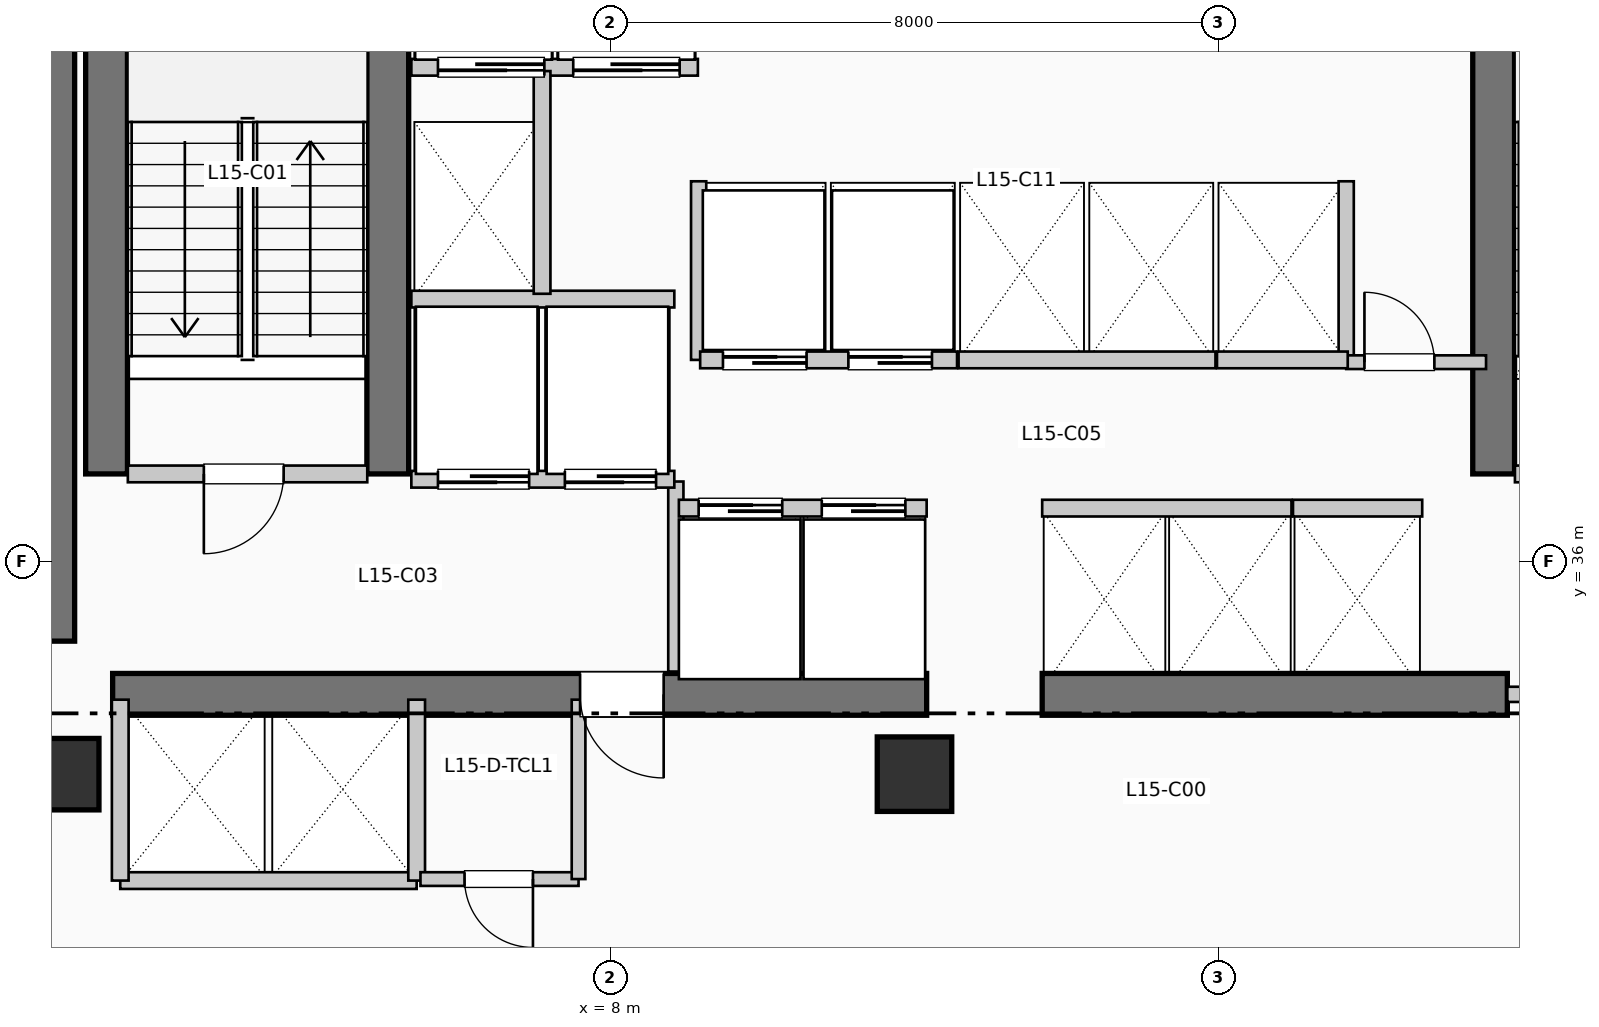
"""IFC4 building model, lengths in metres.
Left out: names, types, materials, properties, quantities, classifications, styles, units other than length and angle.
Written with IfcOpenShell. Run it as: python <this file> out.ifc"""

import sys

from ifc_helpers import new_model, si_unit, direction, frame, frame_2d, origin, origin_2d, place, context, subcontext, project, spatial, rectangle, extrude, element, fill, save


model = new_model("IFC4")
c1 = context("Model", 3, precision=1e-05, world=origin(), true_north=direction((0.0, 1.0)))
c2 = subcontext(c1, "Body", "Model", "MODEL_VIEW")
j1 = project(units=[si_unit("LENGTHUNIT", "METRE"), si_unit("PLANEANGLEUNIT", "RADIAN")], contexts=[c1])
p1 = place(None, origin())
s1 = spatial("IfcSite", under=j1, at=p1, CompositionType="ELEMENT")
p2 = place(p1, origin())
s2 = spatial("IfcBuilding", under=s1, at=p2, CompositionType="ELEMENT")
p3 = place(p2, frame((0.0, 0.0, 66.0)))
s3 = spatial("IfcBuildingStorey", under=s2, at=p3, CompositionType="ELEMENT", Elevation=66.0)
p4 = place(p3, frame((0.5, 34.95, 0.0), z_axis=(0.0, 0.0, 1.0), x_axis=(0.0, 1.0, 0.0)))
e1 = element("IfcWall", 1, at=p4, inside=s3, PredefinedType="SHEAR", context=c2, shape_type="SweptSolid", body=[
    extrude(rectangle(XDim=7.9, YDim=0.9, at=frame_2d((3.95, 0.0))), origin(), (0.0, 0.0, 1.0), 3.96),
])
p5 = place(p3, frame((1.45, 34.25, 0.0), z_axis=(0.0, 0.0, 1.0), x_axis=(1.0, 0.0, 0.0)))
e2 = element("IfcWall", 2, at=p5, inside=s3, PredefinedType="SHEAR", context=c2, shape_type="SweptSolid", body=[
    extrude(rectangle(XDim=10.71, YDim=0.55, at=frame_2d((5.355, 0.0))), origin(), (0.0, 0.0, 1.0), 3.96),
])
p6 = place(p5, frame((7.25, 0.0, 0.0), z_axis=(0.0, 0.0, 1.0), x_axis=(-1.0, 0.0, 0.0)))
e3 = element("IfcOpeningElement", 3, at=p6, cuts=e2, PredefinedType="OPENING", context=c2, shape_type="SweptSolid", body=[
    extrude(rectangle(XDim=1.1, YDim=2.15, at=frame_2d((0.55, 1.075))), frame((0.0, 0.285, 0.0), z_axis=(0.0, -1.0, 0.0), x_axis=(1.0, 0.0, 0.0)), (0.0, 0.0, 1.0), 0.57),
])
p7 = place(p3, frame((13.68, 34.25, 0.0), z_axis=(0.0, 0.0, 1.0), x_axis=(1.0, 0.0, 0.0)))
e4 = element("IfcWall", 4, at=p7, inside=s3, PredefinedType="SHEAR", context=c2, shape_type="SweptSolid", body=[
    extrude(rectangle(XDim=6.12, YDim=0.55, at=frame_2d((3.06, 0.0))), origin(), (0.0, 0.0, 1.0), 3.96),
])
for number, where, z_axis, x_axis in (
    (5, (1.37, 37.15, 0.0), (0.0, 0.0, 1.0), (0.0, 1.0, 0.0)),
    (6, (5.07, 37.15, 0.0), (0.0, 0.0, 1.0), (0.0, 1.0, 0.0)),
    (7, (19.62, 37.15, 0.0), (0.0, 0.0, 1.0), (0.0, 1.0, 0.0)),
):
    element("IfcWall", number, at=place(p3, frame(where, z_axis=z_axis, x_axis=x_axis)), inside=s3, PredefinedType="SHEAR", context=c2, shape_type="SweptSolid", body=[
        extrude(rectangle(XDim=7.89, YDim=0.55, at=frame_2d((3.945, 0.0))), origin(), (0.0, 0.0, 1.0), 3.96),
    ])
p8 = place(p3, frame((0.8, 33.2, 0.0), z_axis=(0.0, 0.0, 1.0), x_axis=(1.0, 0.0, 0.0)))
e8 = element("IfcColumn", 8, at=p8, inside=s3, PredefinedType="COLUMN", context=c2, shape_type="SweptSolid", body=[
    extrude(rectangle(XDim=0.94, YDim=0.94, at=origin_2d()), origin(), (0.0, 0.0, 1.0), 3.96),
])
p9 = place(p3, frame((12.0, 33.2, 0.0), z_axis=(0.0, 0.0, 1.0), x_axis=(1.0, 0.0, 0.0)))
e9 = element("IfcColumn", 9, at=p9, inside=s3, PredefinedType="COLUMN", context=c2, shape_type="SweptSolid", body=[
    extrude(rectangle(XDim=0.98, YDim=0.98, at=origin_2d()), origin(), (0.0, 0.0, 1.0), 3.96),
])
p10 = place(p3, frame((1.65, 37.15, 0.0), z_axis=(0.0, 0.0, 1.0), x_axis=(1.0, 0.0, 0.0)))
e10 = element("IfcWall", 10, at=p10, inside=s3, PredefinedType="PARTITIONING", context=c2, shape_type="SweptSolid", body=[
    extrude(rectangle(XDim=3.15, YDim=0.22, at=frame_2d((1.575, 0.0))), origin(), (0.0, 0.0, 1.0), 3.71),
])
p11 = place(p10, frame((2.05, 0.0, 0.0), z_axis=(0.0, 0.0, 1.0), x_axis=(-1.0, 0.0, 0.0)))
e11 = element("IfcOpeningElement", 11, at=p11, cuts=e10, PredefinedType="OPENING", context=c2, shape_type="SweptSolid", body=[
    extrude(rectangle(XDim=1.05, YDim=2.15, at=frame_2d((0.525, 1.075))), frame((0.0, 0.12, 0.0), z_axis=(0.0, -1.0, 0.0), x_axis=(1.0, 0.0, 0.0)), (0.0, 0.0, 1.0), 0.24),
])
p12 = place(p3, frame((8.86, 34.55, 0.0), z_axis=(0.0, 0.0, 1.0), x_axis=(0.0, 1.0, 0.0)))
e12 = element("IfcWall", 12, at=p12, inside=s3, PredefinedType="PARTITIONING", context=c2, shape_type="SweptSolid", body=[
    extrude(rectangle(XDim=2.5, YDim=0.2, at=frame_2d((1.25, 0.0))), origin(), (0.0, 0.0, 1.0), 3.71),
])
p13 = place(p3, frame((19.9, 37.15, 0.0), z_axis=(0.0, 0.0, 1.0), x_axis=(1.0, 0.0, 0.0)))
e13 = element("IfcWall", 13, at=p13, inside=s3, PredefinedType="PARTITIONING", context=c2, shape_type="SweptSolid", body=[
    extrude(rectangle(XDim=3.15, YDim=0.22, at=frame_2d((1.575, 0.0))), origin(), (0.0, 0.0, 1.0), 3.71),
])
p14 = place(p13, frame((2.05, 0.0, 0.0), z_axis=(0.0, 0.0, 1.0), x_axis=(-1.0, 0.0, 0.0)))
e14 = element("IfcOpeningElement", 14, at=p14, cuts=e13, PredefinedType="OPENING", context=c2, shape_type="SweptSolid", body=[
    extrude(rectangle(XDim=1.05, YDim=2.15, at=frame_2d((0.525, 1.075))), frame((0.0, 0.12, 0.0), z_axis=(0.0, -1.0, 0.0), x_axis=(1.0, 0.0, 0.0)), (0.0, 0.0, 1.0), 0.24),
])
p15 = place(p3, frame((19.8, 34.25, 0.0), z_axis=(0.0, 0.0, 1.0), x_axis=(1.0, 0.0, 0.0)))
e15 = element("IfcWall", 15, at=p15, inside=s3, PredefinedType="PARTITIONING", context=c2, shape_type="SweptSolid", body=[
    extrude(rectangle(XDim=3.25, YDim=0.2, at=frame_2d((1.625, 0.0))), origin(), (0.0, 0.0, 1.0), 3.71),
])
p16 = place(p15, frame((2.15, 0.0, 0.0), z_axis=(0.0, 0.0, 1.0), x_axis=(-1.0, 0.0, 0.0)))
e16 = element("IfcOpeningElement", 16, at=p16, cuts=e15, PredefinedType="OPENING", context=c2, shape_type="SweptSolid", body=[
    extrude(rectangle(XDim=1.1, YDim=2.15, at=frame_2d((0.55, 1.075))), frame((0.0, 0.11, 0.0), z_axis=(0.0, -1.0, 0.0), x_axis=(1.0, 0.0, 0.0)), (0.0, 0.0, 1.0), 0.22),
])
p17 = place(p3, frame((5.38, 37.08, 0.0), z_axis=(0.0, 0.0, 1.0), x_axis=(1.0, 0.0, 0.0)))
e17 = element("IfcWall", 17, at=p17, inside=s3, PredefinedType="PARTITIONING", context=c2, shape_type="SweptSolid", body=[
    extrude(rectangle(XDim=3.46, YDim=0.22, at=frame_2d((1.73, 0.0))), origin(), (0.0, 0.0, 1.0), 3.71),
])
p18 = place(p17, frame((1.55, 0.0, 0.0), z_axis=(0.0, 0.0, 1.0), x_axis=(-1.0, 0.0, 0.0)))
e18 = element("IfcOpeningElement", 18, at=p18, cuts=e17, PredefinedType="OPENING", context=c2, shape_type="SweptSolid", body=[
    extrude(rectangle(XDim=1.2, YDim=2.2, at=frame_2d((0.6, 1.1))), frame((0.0, 0.12, 0.0), z_axis=(0.0, -1.0, 0.0), x_axis=(1.0, 0.0, 0.0)), (0.0, 0.0, 1.0), 0.24),
])
p19 = place(p17, frame((3.22, 0.0, 0.0), z_axis=(0.0, 0.0, 1.0), x_axis=(-1.0, 0.0, 0.0)))
e19 = element("IfcOpeningElement", 19, at=p19, cuts=e17, PredefinedType="OPENING", context=c2, shape_type="SweptSolid", body=[
    extrude(rectangle(XDim=1.2, YDim=2.2, at=frame_2d((0.6, 1.1))), frame((0.0, 0.12, 0.0), z_axis=(0.0, -1.0, 0.0), x_axis=(1.0, 0.0, 0.0)), (0.0, 0.0, 1.0), 0.24),
])
p20 = place(p3, frame((5.38, 39.45, 0.0), z_axis=(0.0, 0.0, 1.0), x_axis=(1.0, 0.0, 0.0)))
e20 = element("IfcWall", 20, at=p20, inside=s3, PredefinedType="PARTITIONING", context=c2, shape_type="SweptSolid", body=[
    extrude(rectangle(XDim=3.46, YDim=0.22, at=frame_2d((1.73, 0.0))), origin(), (0.0, 0.0, 1.0), 3.71),
])
p21 = place(p3, frame((5.38, 42.5, 0.0), z_axis=(0.0, 0.0, 1.0), x_axis=(1.0, 0.0, 0.0)))
e21 = element("IfcWall", 21, at=p21, inside=s3, PredefinedType="PARTITIONING", context=c2, shape_type="SweptSolid", body=[
    extrude(rectangle(XDim=3.77, YDim=0.22, at=frame_2d((1.885, 0.0))), origin(), (0.0, 0.0, 1.0), 3.71),
])
p22 = place(p21, frame((1.75, 0.0, 0.0), z_axis=(0.0, 0.0, 1.0), x_axis=(-1.0, 0.0, 0.0)))
e22 = element("IfcOpeningElement", 22, at=p22, cuts=e21, PredefinedType="OPENING", context=c2, shape_type="SweptSolid", body=[
    extrude(rectangle(XDim=1.4, YDim=2.2, at=frame_2d((0.7, 1.1))), frame((0.0, 0.12, 0.0), z_axis=(0.0, -1.0, 0.0), x_axis=(1.0, 0.0, 0.0)), (0.0, 0.0, 1.0), 0.24),
])
p23 = place(p21, frame((3.53, 0.0, 0.0), z_axis=(0.0, 0.0, 1.0), x_axis=(-1.0, 0.0, 0.0)))
e23 = element("IfcOpeningElement", 23, at=p23, cuts=e21, PredefinedType="OPENING", context=c2, shape_type="SweptSolid", body=[
    extrude(rectangle(XDim=1.4, YDim=2.2, at=frame_2d((0.7, 1.1))), frame((0.0, 0.12, 0.0), z_axis=(0.0, -1.0, 0.0), x_axis=(1.0, 0.0, 0.0)), (0.0, 0.0, 1.0), 0.24),
])
p24 = place(p3, frame((7.1, 39.52, 0.0), z_axis=(0.0, 0.0, 1.0), x_axis=(0.0, 1.0, 0.0)))
e24 = element("IfcWall", 24, at=p24, inside=s3, PredefinedType="PARTITIONING", context=c2, shape_type="SweptSolid", body=[
    extrude(rectangle(XDim=2.93, YDim=0.22, at=frame_2d((1.465, 0.0))), origin(), (0.0, 0.0, 1.0), 3.71),
])
p25 = place(p3, frame((1.55, 31.8, 0.0), z_axis=(0.0, 0.0, 1.0), x_axis=(1.0, 0.0, 0.0)))
e25 = element("IfcWall", 25, at=p25, inside=s3, PredefinedType="PARTITIONING", context=c2, shape_type="SweptSolid", body=[
    extrude(rectangle(XDim=3.9, YDim=0.22, at=frame_2d((1.95, 0.0))), origin(), (0.0, 0.0, 1.0), 3.71),
])
for number, where, z_axis, x_axis in (
    (26, (1.55, 31.8, 0.0), (0.0, 0.0, 1.0), (0.0, 1.0, 0.0)),
    (27, (5.45, 31.8, 0.0), (0.0, 0.0, 1.0), (0.0, 1.0, 0.0)),
):
    element("IfcWall", number, at=place(p3, frame(where, z_axis=z_axis, x_axis=x_axis)), inside=s3, PredefinedType="PARTITIONING", context=c2, shape_type="SweptSolid", body=[
        extrude(rectangle(XDim=2.38, YDim=0.22, at=frame_2d((1.19, 0.0))), origin(), (0.0, 0.0, 1.0), 3.71),
    ])
for number, where, z_axis, x_axis in (
    (28, (9.16, 38.65, 0.0), (0.0, 0.0, 1.0), (0.0, 1.0, 0.0)),
    (29, (17.68, 38.65, 0.0), (0.0, 0.0, 1.0), (0.0, 1.0, 0.0)),
):
    element("IfcWall", number, at=place(p3, frame(where, z_axis=z_axis, x_axis=x_axis)), inside=s3, PredefinedType="PARTITIONING", context=c2, shape_type="SweptSolid", body=[
        extrude(rectangle(XDim=2.35, YDim=0.2, at=frame_2d((1.175, 0.0))), origin(), (0.0, 0.0, 1.0), 3.71),
    ])
p26 = place(p3, frame((17.68, 38.62, 0.0), z_axis=(0.0, 0.0, 1.0), x_axis=(1.0, 0.0, 0.0)))
e30 = element("IfcWall", 30, at=p26, inside=s3, PredefinedType="PARTITIONING", context=c2, shape_type="SweptSolid", body=[
    extrude(rectangle(XDim=1.84, YDim=0.18, at=frame_2d((0.92, 0.0))), origin(), (0.0, 0.0, 1.0), 3.71),
])
p27 = place(p26, frame((0.24, 0.0, 0.0)))
e31 = element("IfcOpeningElement", 31, at=p27, cuts=e30, PredefinedType="OPENING", context=c2, shape_type="SweptSolid", body=[
    extrude(rectangle(XDim=0.92, YDim=2.1, at=frame_2d((0.46, 1.05))), frame((0.0, 0.1, 0.0), z_axis=(0.0, -1.0, 0.0), x_axis=(1.0, 0.0, 0.0)), (0.0, 0.0, 1.0), 0.2),
])
p28 = place(p3, frame((5.5, 31.82, 0.0), z_axis=(0.0, 0.0, 1.0), x_axis=(1.0, 0.0, 0.0)))
e32 = element("IfcWall", 32, at=p28, inside=s3, PredefinedType="PLUMBINGWALL", context=c2, shape_type="SweptSolid", body=[
    extrude(rectangle(XDim=2.08, YDim=0.18, at=frame_2d((1.04, 0.0))), origin(), (0.0, 0.0, 1.0), 3.71),
])
p29 = place(p28, frame((1.48, 0.0, 0.0), z_axis=(0.0, 0.0, 1.0), x_axis=(-1.0, 0.0, 0.0)))
e33 = element("IfcOpeningElement", 33, at=p29, cuts=e32, PredefinedType="OPENING", context=c2, shape_type="SweptSolid", body=[
    extrude(rectangle(XDim=0.9, YDim=2.1, at=frame_2d((0.45, 1.05))), frame((0.0, 0.1, 0.0), z_axis=(0.0, -1.0, 0.0), x_axis=(1.0, 0.0, 0.0)), (0.0, 0.0, 1.0), 0.2),
])
p30 = place(p3, frame((7.58, 31.82, 0.0), z_axis=(0.0, 0.0, 1.0), x_axis=(0.0, 1.0, 0.0)))
e34 = element("IfcWall", 34, at=p30, inside=s3, PredefinedType="PLUMBINGWALL", context=c2, shape_type="SweptSolid", body=[
    extrude(rectangle(XDim=2.36, YDim=0.18, at=frame_2d((1.18, 0.0))), origin(), (0.0, 0.0, 1.0), 3.71),
])
p31 = place(p3, frame((8.9, 36.7, 0.0), z_axis=(0.0, 0.0, 1.0), x_axis=(1.0, 0.0, 0.0)))
e35 = element("IfcWall", 35, at=p31, inside=s3, PredefinedType="PARTITIONING", context=c2, shape_type="SweptSolid", body=[
    extrude(rectangle(XDim=3.26, YDim=0.22, at=frame_2d((1.63, 0.0))), origin(), (0.0, 0.0, 1.0), 3.71),
])
p32 = place(p31, frame((0.26, 0.0, 0.0)))
e36 = element("IfcOpeningElement", 36, at=p32, cuts=e35, PredefinedType="OPENING", context=c2, shape_type="SweptSolid", body=[
    extrude(rectangle(XDim=1.1, YDim=2.2, at=frame_2d((0.55, 1.1))), frame((0.0, 0.12, 0.0), z_axis=(0.0, -1.0, 0.0), x_axis=(1.0, 0.0, 0.0)), (0.0, 0.0, 1.0), 0.24),
])
p33 = place(p31, frame((1.88, 0.0, 0.0)))
e37 = element("IfcOpeningElement", 37, at=p33, cuts=e35, PredefinedType="OPENING", context=c2, shape_type="SweptSolid", body=[
    extrude(rectangle(XDim=1.1, YDim=2.2, at=frame_2d((0.55, 1.1))), frame((0.0, 0.12, 0.0), z_axis=(0.0, -1.0, 0.0), x_axis=(1.0, 0.0, 0.0)), (0.0, 0.0, 1.0), 0.24),
])
p34 = place(p3, frame((9.18, 38.65, 0.0), z_axis=(0.0, 0.0, 1.0), x_axis=(1.0, 0.0, 0.0)))
e38 = element("IfcWall", 38, at=p34, inside=s3, PredefinedType="PARTITIONING", context=c2, shape_type="SweptSolid", body=[
    extrude(rectangle(XDim=3.38, YDim=0.22, at=frame_2d((1.69, 0.0))), origin(), (0.0, 0.0, 1.0), 3.71),
])
p35 = place(p34, frame((0.3, 0.0, 0.0)))
e39 = element("IfcOpeningElement", 39, at=p35, cuts=e38, PredefinedType="OPENING", context=c2, shape_type="SweptSolid", body=[
    extrude(rectangle(XDim=1.1, YDim=2.2, at=frame_2d((0.55, 1.1))), frame((0.0, 0.12, 0.0), z_axis=(0.0, -1.0, 0.0), x_axis=(1.0, 0.0, 0.0)), (0.0, 0.0, 1.0), 0.24),
])
p36 = place(p34, frame((1.95, 0.0, 0.0)))
e40 = element("IfcOpeningElement", 40, at=p36, cuts=e38, PredefinedType="OPENING", context=c2, shape_type="SweptSolid", body=[
    extrude(rectangle(XDim=1.1, YDim=2.2, at=frame_2d((0.55, 1.1))), frame((0.0, 0.12, 0.0), z_axis=(0.0, -1.0, 0.0), x_axis=(1.0, 0.0, 0.0)), (0.0, 0.0, 1.0), 0.24),
])
p37 = place(p3, frame((13.68, 36.7, 0.0), z_axis=(0.0, 0.0, 1.0), x_axis=(1.0, 0.0, 0.0)))
e41 = element("IfcWall", 41, at=p37, inside=s3, PredefinedType="PARTITIONING", context=c2, shape_type="SweptSolid", body=[
    extrude(rectangle(XDim=3.28, YDim=0.22, at=frame_2d((1.64, 0.0))), origin(), (0.0, 0.0, 1.0), 3.71),
])
p38 = place(p3, frame((12.58, 38.65, 0.0), z_axis=(0.0, 0.0, 1.0), x_axis=(1.0, 0.0, 0.0)))
e42 = element("IfcWall", 42, at=p38, inside=s3, PredefinedType="PARTITIONING", context=c2, shape_type="SweptSolid", body=[
    extrude(rectangle(XDim=3.38, YDim=0.22, at=frame_2d((1.69, 0.0))), origin(), (0.0, 0.0, 1.0), 3.71),
])
p39 = place(p3, frame((16.98, 36.7, 0.0), z_axis=(0.0, 0.0, 1.0), x_axis=(1.0, 0.0, 0.0)))
e43 = element("IfcWall", 43, at=p39, inside=s3, PredefinedType="PARTITIONING", context=c2, shape_type="SweptSolid", body=[
    extrude(rectangle(XDim=1.7, YDim=0.22, at=frame_2d((0.85, 0.0))), origin(), (0.0, 0.0, 1.0), 3.71),
])
p40 = place(p3, frame((15.98, 38.65, 0.0), z_axis=(0.0, 0.0, 1.0), x_axis=(1.0, 0.0, 0.0)))
e44 = element("IfcWall", 44, at=p40, inside=s3, PredefinedType="PARTITIONING", context=c2, shape_type="SweptSolid", body=[
    extrude(rectangle(XDim=1.72, YDim=0.22, at=frame_2d((0.86, 0.0))), origin(), (0.0, 0.0, 1.0), 3.71),
])
p41 = place(p11, origin())
e45 = element("IfcDoor", 45, at=p41, inside=s3, OperationType="SINGLE_SWING_LEFT", PredefinedType="DOOR", context=c2, shape_type="SweptSolid", body=[
    extrude(rectangle(XDim=1.05, YDim=2.15, at=frame_2d((0.525, 1.075))), frame((0.0, 0.025, 0.0), z_axis=(0.0, -1.0, 0.0), x_axis=(1.0, 0.0, 0.0)), (0.0, 0.0, 1.0), 0.05),
])
fill(e11, e45)
p42 = place(p6, origin())
e46 = element("IfcDoor", 46, at=p42, inside=s3, OperationType="SINGLE_SWING_RIGHT", PredefinedType="DOOR", context=c2, shape_type="SweptSolid", body=[
    extrude(rectangle(XDim=1.1, YDim=2.15, at=frame_2d((0.55, 1.075))), frame((0.0, 0.025, 0.0), z_axis=(0.0, -1.0, 0.0), x_axis=(1.0, 0.0, 0.0)), (0.0, 0.0, 1.0), 0.05),
])
fill(e3, e46)
p43 = place(p18, origin())
e47 = element("IfcDoor", 47, at=p43, inside=s3, OperationType="SLIDING_TO_RIGHT", PredefinedType="DOOR", context=c2, shape_type="SweptSolid", body=[
    extrude(rectangle(XDim=1.2, YDim=2.2, at=frame_2d((0.6, 1.1))), frame((0.0, 0.025, 0.0), z_axis=(0.0, -1.0, 0.0), x_axis=(1.0, 0.0, 0.0)), (0.0, 0.0, 1.0), 0.05),
])
fill(e18, e47)
p44 = place(p19, origin())
e48 = element("IfcDoor", 48, at=p44, inside=s3, OperationType="SLIDING_TO_RIGHT", PredefinedType="DOOR", context=c2, shape_type="SweptSolid", body=[
    extrude(rectangle(XDim=1.2, YDim=2.2, at=frame_2d((0.6, 1.1))), frame((0.0, 0.025, 0.0), z_axis=(0.0, -1.0, 0.0), x_axis=(1.0, 0.0, 0.0)), (0.0, 0.0, 1.0), 0.05),
])
fill(e19, e48)
p45 = place(p22, origin())
e49 = element("IfcDoor", 49, at=p45, inside=s3, OperationType="SLIDING_TO_LEFT", PredefinedType="DOOR", context=c2, shape_type="SweptSolid", body=[
    extrude(rectangle(XDim=1.4, YDim=2.2, at=frame_2d((0.7, 1.1))), frame((0.0, 0.025, 0.0), z_axis=(0.0, -1.0, 0.0), x_axis=(1.0, 0.0, 0.0)), (0.0, 0.0, 1.0), 0.05),
])
fill(e22, e49)
p46 = place(p23, origin())
e50 = element("IfcDoor", 50, at=p46, inside=s3, OperationType="SLIDING_TO_LEFT", PredefinedType="DOOR", context=c2, shape_type="SweptSolid", body=[
    extrude(rectangle(XDim=1.4, YDim=2.2, at=frame_2d((0.7, 1.1))), frame((0.0, 0.025, 0.0), z_axis=(0.0, -1.0, 0.0), x_axis=(1.0, 0.0, 0.0)), (0.0, 0.0, 1.0), 0.05),
])
fill(e23, e50)
p47 = place(p27, origin())
e51 = element("IfcDoor", 51, at=p47, inside=s3, OperationType="SINGLE_SWING_LEFT", PredefinedType="DOOR", context=c2, shape_type="SweptSolid", body=[
    extrude(rectangle(XDim=0.92, YDim=2.1, at=frame_2d((0.46, 1.05))), frame((0.0, 0.025, 0.0), z_axis=(0.0, -1.0, 0.0), x_axis=(1.0, 0.0, 0.0)), (0.0, 0.0, 1.0), 0.05),
])
fill(e31, e51)
p48 = place(p29, origin())
e52 = element("IfcDoor", 52, at=p48, inside=s3, OperationType="SINGLE_SWING_RIGHT", PredefinedType="DOOR", context=c2, shape_type="SweptSolid", body=[
    extrude(rectangle(XDim=0.9, YDim=2.1, at=frame_2d((0.45, 1.05))), frame((0.0, 0.025, 0.0), z_axis=(0.0, -1.0, 0.0), x_axis=(1.0, 0.0, 0.0)), (0.0, 0.0, 1.0), 0.05),
])
fill(e33, e52)
p49 = place(p32, origin())
e53 = element("IfcDoor", 53, at=p49, inside=s3, OperationType="SLIDING_TO_LEFT", PredefinedType="DOOR", context=c2, shape_type="SweptSolid", body=[
    extrude(rectangle(XDim=1.1, YDim=2.2, at=frame_2d((0.55, 1.1))), frame((0.0, 0.025, 0.0), z_axis=(0.0, -1.0, 0.0), x_axis=(1.0, 0.0, 0.0)), (0.0, 0.0, 1.0), 0.05),
])
fill(e36, e53)
p50 = place(p33, origin())
e54 = element("IfcDoor", 54, at=p50, inside=s3, OperationType="SLIDING_TO_LEFT", PredefinedType="DOOR", context=c2, shape_type="SweptSolid", body=[
    extrude(rectangle(XDim=1.1, YDim=2.2, at=frame_2d((0.55, 1.1))), frame((0.0, 0.025, 0.0), z_axis=(0.0, -1.0, 0.0), x_axis=(1.0, 0.0, 0.0)), (0.0, 0.0, 1.0), 0.05),
])
fill(e37, e54)
p51 = place(p35, origin())
e55 = element("IfcDoor", 55, at=p51, inside=s3, OperationType="SLIDING_TO_LEFT", PredefinedType="DOOR", context=c2, shape_type="SweptSolid", body=[
    extrude(rectangle(XDim=1.1, YDim=2.2, at=frame_2d((0.55, 1.1))), frame((0.0, 0.025, 0.0), z_axis=(0.0, -1.0, 0.0), x_axis=(1.0, 0.0, 0.0)), (0.0, 0.0, 1.0), 0.05),
])
fill(e39, e55)
p52 = place(p36, origin())
e56 = element("IfcDoor", 56, at=p52, inside=s3, OperationType="SLIDING_TO_LEFT", PredefinedType="DOOR", context=c2, shape_type="SweptSolid", body=[
    extrude(rectangle(XDim=1.1, YDim=2.2, at=frame_2d((0.55, 1.1))), frame((0.0, 0.025, 0.0), z_axis=(0.0, -1.0, 0.0), x_axis=(1.0, 0.0, 0.0)), (0.0, 0.0, 1.0), 0.05),
])
fill(e40, e56)
save(model, sys.argv[1])
